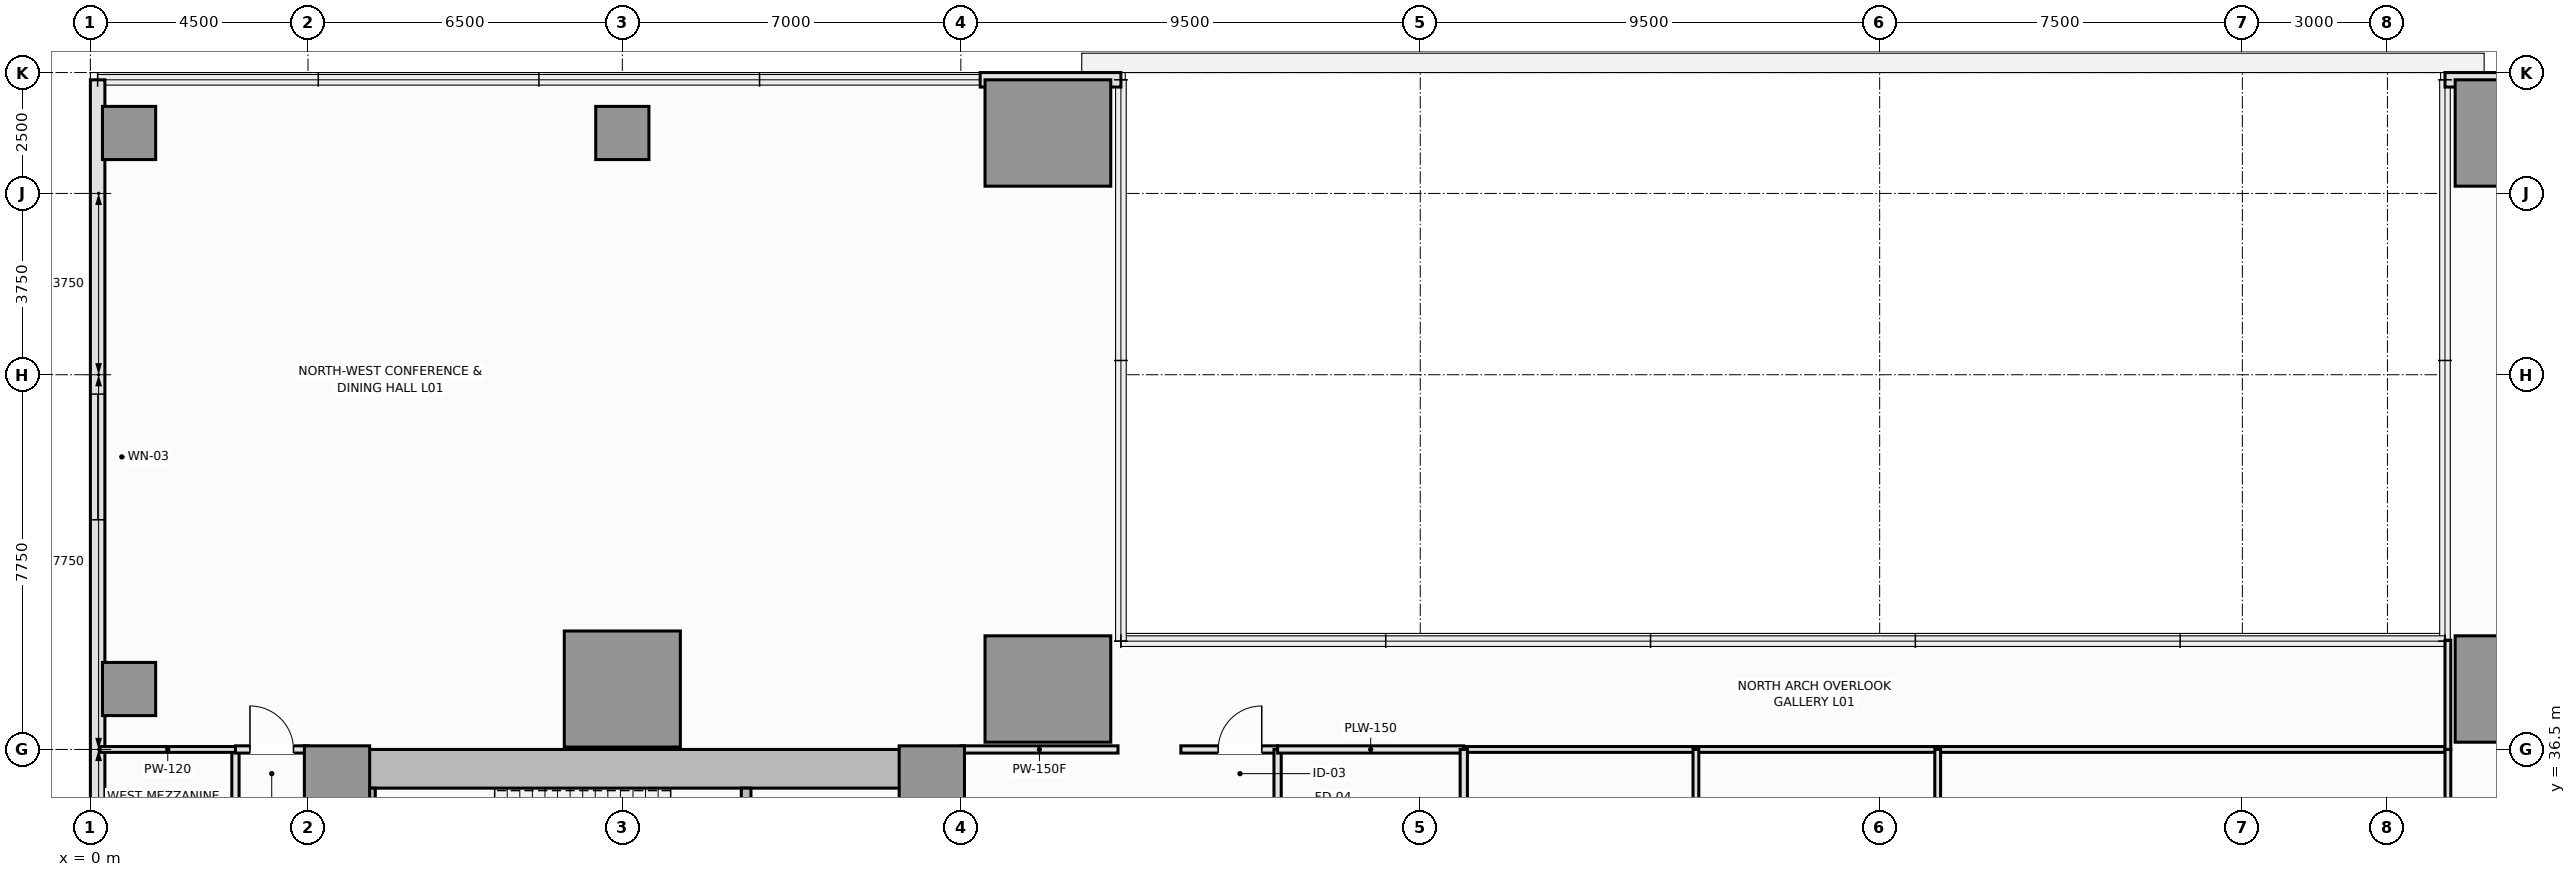
"""IFC4 building model, lengths in metres.
Left out: names, types, materials, properties, quantities, classifications, styles, units other than length and angle.
Written with IfcOpenShell. Run it as: python <this file> out.ifc"""

import sys

from ifc_helpers import new_model, si_unit, direction, frame, frame_2d, origin, origin_2d, place, context, subcontext, project, spatial, rectangle, extrude, element, fill, save


model = new_model("IFC4")
c1 = context("Model", 3, precision=1e-05, world=origin(), true_north=direction((0.0, 1.0)))
c2 = subcontext(c1, "Body", "Model", "MODEL_VIEW")
j1 = project(units=[si_unit("LENGTHUNIT", "METRE"), si_unit("PLANEANGLEUNIT", "RADIAN")], contexts=[c1])
p1 = place(None, origin())
s1 = spatial("IfcSite", under=j1, at=p1, CompositionType="ELEMENT")
p2 = place(p1, origin())
s2 = spatial("IfcBuilding", under=s1, at=p2, CompositionType="ELEMENT")
p3 = place(p2, frame((0.0, 0.0, 6.0)))
s3 = spatial("IfcBuildingStorey", under=s2, at=p3, CompositionType="ELEMENT", Elevation=6.0)
p4 = place(p3, frame((4.5, 36.1, 0.0), z_axis=(0.0, 0.0, 1.0), x_axis=(1.0, 0.0, 0.0)))
e1 = element("IfcWall", 1, at=p4, inside=s3, PredefinedType="SHEAR", context=c2, shape_type="SweptSolid", body=[
    extrude(rectangle(XDim=13.5, YDim=0.8, at=frame_2d((6.75, 0.0))), origin(), (0.0, 0.0, 1.0), 4.8),
])
p5 = place(p3, frame((4.9, 14.8, 0.0), z_axis=(0.0, 0.0, 1.0), x_axis=(0.0, 1.0, 0.0)))
e2 = element("IfcWall", 2, at=p5, inside=s3, PredefinedType="SHEAR", context=c2, shape_type="SweptSolid", body=[
    extrude(rectangle(XDim=20.9, YDim=0.8, at=frame_2d((10.45, 0.0))), origin(), (0.0, 0.0, 1.0), 4.8),
])
p6 = place(p3, frame((17.6, 27.05, 0.0), z_axis=(0.0, 0.0, 1.0), x_axis=(0.0, 1.0, 0.0)))
e3 = element("IfcWall", 3, at=p6, inside=s3, PredefinedType="SHEAR", context=c2, shape_type="SweptSolid", body=[
    extrude(rectangle(XDim=8.65, YDim=0.8, at=frame_2d((4.325, 0.0))), origin(), (0.0, 0.0, 1.0), 4.8),
])
p7 = place(p6, frame((3.45, 0.0, 0.0)))
e4 = element("IfcOpeningElement", 4, at=p7, cuts=e3, PredefinedType="OPENING", context=c2, shape_type="SweptSolid", body=[
    extrude(rectangle(XDim=1.1, YDim=2.15, at=frame_2d((0.55, 1.075))), frame((0.0, 0.41, 0.0), z_axis=(0.0, -1.0, 0.0), x_axis=(1.0, 0.0, 0.0)), (0.0, 0.0, 1.0), 0.82),
])
for number, where, z_axis, x_axis in (
    (5, (5.1, 35.9, 0.0), (0.0, 0.0, 1.0), (1.0, 0.0, 0.0)),
    (6, (17.4, 35.9, 0.0), (0.0, 0.0, 1.0), (1.0, 0.0, 0.0)),
):
    element("IfcColumn", number, at=place(p3, frame(where, z_axis=z_axis, x_axis=x_axis)), inside=s3, PredefinedType="PILASTER", context=c2, shape_type="SweptSolid", body=[
        extrude(rectangle(XDim=1.35, YDim=1.35, at=origin_2d()), origin(), (0.0, 0.0, 1.0), 4.8),
    ])
p8 = place(p3, frame((11.0, 37.75, 0.0), z_axis=(0.0, 0.0, 1.0), x_axis=(1.0, 0.0, 0.0)))
e7 = element("IfcColumn", 7, at=p8, inside=s3, PredefinedType="COLUMN", context=c2, shape_type="SweptSolid", body=[
    extrude(rectangle(XDim=2.4, YDim=2.4, at=origin_2d()), origin(), (0.0, 0.0, 1.0), 4.8),
])
for number, where, z_axis, x_axis in (
    (8, (19.8, 37.75, 0.0), (0.0, 0.0, 1.0), (1.0, 0.0, 0.0)),
    (9, (50.2, 37.75, 0.0), (0.0, 0.0, 1.0), (1.0, 0.0, 0.0)),
    (10, (19.8, 49.25, 0.0), (0.0, 0.0, 1.0), (1.0, 0.0, 0.0)),
    (11, (50.2, 49.25, 0.0), (0.0, 0.0, 1.0), (1.0, 0.0, 0.0)),
):
    element("IfcColumn", number, at=place(p3, frame(where, z_axis=z_axis, x_axis=x_axis)), inside=s3, PredefinedType="COLUMN", context=c2, shape_type="SweptSolid", body=[
        extrude(rectangle(XDim=2.6, YDim=2.2, at=origin_2d()), origin(), (0.0, 0.0, 1.0), 4.8),
    ])
for number, where, z_axis, x_axis in (
    (12, (0.8, 37.75, 0.0), (0.0, 0.0, 1.0), (1.0, 0.0, 0.0)),
    (13, (0.8, 49.25, 0.0), (0.0, 0.0, 1.0), (1.0, 0.0, 0.0)),
    (14, (11.0, 49.25, 0.0), (0.0, 0.0, 1.0), (1.0, 0.0, 0.0)),
):
    element("IfcColumn", number, at=place(p3, frame(where, z_axis=z_axis, x_axis=x_axis)), inside=s3, PredefinedType="COLUMN", context=c2, shape_type="SweptSolid", body=[
        extrude(rectangle(XDim=1.1, YDim=1.1, at=origin_2d()), origin(), (0.0, 0.0, 1.0), 4.8),
    ])
p9 = place(p3, frame((0.15, 50.35, 0.0), z_axis=(0.0, 0.0, 1.0), x_axis=(0.0, -1.0, 0.0)))
e15 = element("IfcWall", 15, at=p9, inside=s3, PredefinedType="SOLIDWALL", context=c2, shape_type="SweptSolid", body=[
    extrude(rectangle(XDim=50.2, YDim=0.3, at=frame_2d((25.1, 0.0))), origin(), (0.0, 0.0, 1.0), 4.6),
])
p10 = place(p9, frame((6.5, 0.0, 0.9)))
e16 = element("IfcOpeningElement", 16, at=p10, cuts=e15, PredefinedType="OPENING", context=c2, shape_type="SweptSolid", body=[
    extrude(rectangle(XDim=2.6, YDim=2.2, at=frame_2d((1.3, 1.1))), frame((0.0, 0.16, 0.0), z_axis=(0.0, -1.0, 0.0), x_axis=(1.0, 0.0, 0.0)), (0.0, 0.0, 1.0), 0.32),
])
p11 = place(p9, frame((42.0, 0.0, 0.9)))
e17 = element("IfcOpeningElement", 17, at=p11, cuts=e15, PredefinedType="OPENING", context=c2, shape_type="SweptSolid", body=[
    extrude(rectangle(XDim=2.6, YDim=2.2, at=frame_2d((1.3, 1.1))), frame((0.0, 0.16, 0.0), z_axis=(0.0, -1.0, 0.0), x_axis=(1.0, 0.0, 0.0)), (0.0, 0.0, 1.0), 0.32),
])
for number, where, z_axis, x_axis in (
    (18, (51.6, 50.35, 0.0), (0.0, 0.0, 1.0), (-1.0, 0.0, 0.0)),
    (19, (21.31, 50.35, 0.0), (0.0, 0.0, 1.0), (-1.0, 0.0, 0.0)),
):
    element("IfcWall", number, at=place(p3, frame(where, z_axis=z_axis, x_axis=x_axis)), inside=s3, PredefinedType="SOLIDWALL", context=c2, shape_type="SweptSolid", body=[
        extrude(rectangle(XDim=2.91, YDim=0.3, at=frame_2d((1.455, 0.0))), origin(), (0.0, 0.0, 1.0), 4.6),
    ])
p12 = place(p3, frame((5.79, 32.65, 0.0), z_axis=(0.0, 0.0, 1.0), x_axis=(0.0, 1.0, 0.0)))
e20 = element("IfcWall", 20, at=p12, inside=s3, PredefinedType="SOLIDWALL", context=c2, shape_type="SweptSolid", body=[
    extrude(rectangle(XDim=3.05, YDim=0.2, at=frame_2d((1.525, 0.0))), origin(), (0.0, 0.0, 1.0), 4.8),
])
p13 = place(p3, frame((13.56, 32.65, 0.0), z_axis=(0.0, 0.0, 1.0), x_axis=(0.0, 1.0, 0.0)))
e21 = element("IfcWall", 21, at=p13, inside=s3, PredefinedType="SOLIDWALL", context=c2, shape_type="SweptSolid", body=[
    extrude(rectangle(XDim=3.05, YDim=0.2, at=frame_2d((1.525, 0.0))), origin(), (0.0, 0.0, 1.0), 4.8),
])
p14 = place(p13, frame((0.95, 0.0, 0.0)))
e22 = element("IfcOpeningElement", 22, at=p14, cuts=e21, PredefinedType="OPENING", context=c2, shape_type="SweptSolid", body=[
    extrude(rectangle(XDim=1.15, YDim=2.15, at=frame_2d((0.575, 1.075))), frame((0.0, 0.11, 0.0), z_axis=(0.0, -1.0, 0.0), x_axis=(1.0, 0.0, 0.0)), (0.0, 0.0, 1.0), 0.22),
])
p15 = place(p3, frame((18.0, 36.5, 0.0), z_axis=(0.0, 0.0, 1.0), x_axis=(1.0, 0.0, 0.0)))
e23 = element("IfcWall", 23, at=p15, inside=s3, PredefinedType="PARTITIONING", context=c2, shape_type="SweptSolid", body=[
    extrude(rectangle(XDim=3.25, YDim=0.15, at=frame_2d((1.625, 0.0))), origin(), (0.0, 0.0, 1.0), 4.6),
])
p16 = place(p3, frame((22.55, 36.5, 0.0), z_axis=(0.0, 0.0, 1.0), x_axis=(1.0, 0.0, 0.0)))
e24 = element("IfcWall", 24, at=p16, inside=s3, PredefinedType="PARTITIONING", context=c2, shape_type="SweptSolid", body=[
    extrude(rectangle(XDim=2.0, YDim=0.15, at=frame_2d((1.0, 0.0))), origin(), (0.0, 0.0, 1.0), 4.6),
])
p17 = place(p16, frame((0.772, 0.0, 0.0)))
e25 = element("IfcOpeningElement", 25, at=p17, cuts=e24, PredefinedType="OPENING", context=c2, shape_type="SweptSolid", body=[
    extrude(rectangle(XDim=0.9, YDim=2.1, at=frame_2d((0.45, 1.05))), frame((0.0, 0.085, 0.0), z_axis=(0.0, -1.0, 0.0), x_axis=(1.0, 0.0, 0.0)), (0.0, 0.0, 1.0), 0.17),
])
p18 = place(p3, frame((24.55, 33.4, 0.0), z_axis=(0.0, 0.0, 1.0), x_axis=(0.0, 1.0, 0.0)))
e26 = element("IfcWall", 26, at=p18, inside=s3, PredefinedType="PLUMBINGWALL", context=c2, shape_type="SweptSolid", body=[
    extrude(rectangle(XDim=3.1, YDim=0.15, at=frame_2d((1.55, 0.0))), origin(), (0.0, 0.0, 1.0), 4.6),
])
p19 = place(p18, frame((1.1, 0.0, 0.0)))
e27 = element("IfcOpeningElement", 27, at=p19, cuts=e26, PredefinedType="OPENING", context=c2, shape_type="SweptSolid", body=[
    extrude(rectangle(XDim=0.9, YDim=2.1, at=frame_2d((0.45, 1.05))), frame((0.0, 0.085, 0.0), z_axis=(0.0, -1.0, 0.0), x_axis=(1.0, 0.0, 0.0)), (0.0, 0.0, 1.0), 0.17),
])
p20 = place(p3, frame((3.0, 25.25, 0.0), z_axis=(0.0, 0.0, 1.0), x_axis=(0.0, 1.0, 0.0)))
e28 = element("IfcWall", 28, at=p20, inside=s3, PredefinedType="PARTITIONING", context=c2, shape_type="SweptSolid", body=[
    extrude(rectangle(XDim=11.25, YDim=0.15, at=frame_2d((5.625, 0.0))), origin(), (0.0, 0.0, 1.0), 4.6),
])
p21 = place(p20, frame((5.125, 0.0, 0.0)))
e29 = element("IfcOpeningElement", 29, at=p21, cuts=e28, PredefinedType="OPENING", context=c2, shape_type="SweptSolid", body=[
    extrude(rectangle(XDim=1.0, YDim=2.15, at=frame_2d((0.5, 1.075))), frame((0.0, 0.085, 0.0), z_axis=(0.0, -1.0, 0.0), x_axis=(1.0, 0.0, 0.0)), (0.0, 0.0, 1.0), 0.17),
])
p22 = place(p3, frame((3.0, 36.5, 0.0), z_axis=(0.0, 0.0, 1.0), x_axis=(1.0, 0.0, 0.0)))
e30 = element("IfcWall", 30, at=p22, inside=s3, PredefinedType="PARTITIONING", context=c2, shape_type="SweptSolid", body=[
    extrude(rectangle(XDim=1.5, YDim=0.15, at=frame_2d((0.75, 0.0))), origin(), (0.0, 0.0, 1.0), 4.6),
])
p23 = place(p22, frame((0.3, 0.0, 0.0)))
e31 = element("IfcOpeningElement", 31, at=p23, cuts=e30, PredefinedType="OPENING", context=c2, shape_type="SweptSolid", body=[
    extrude(rectangle(XDim=0.9, YDim=2.1, at=frame_2d((0.45, 1.05))), frame((0.0, 0.085, 0.0), z_axis=(0.0, -1.0, 0.0), x_axis=(1.0, 0.0, 0.0)), (0.0, 0.0, 1.0), 0.17),
])
p24 = place(p3, frame((0.2, 36.5, 0.0), z_axis=(0.0, 0.0, 1.0), x_axis=(1.0, 0.0, 0.0)))
e32 = element("IfcWall", 32, at=p24, inside=s3, PredefinedType="PARTITIONING", context=c2, shape_type="SweptSolid", body=[
    extrude(rectangle(XDim=2.8, YDim=0.12, at=frame_2d((1.4, 0.0))), origin(), (0.0, 0.0, 1.0), 4.6),
])
p25 = place(p3, frame((24.55, 36.5, 0.0), z_axis=(0.0, 0.0, 1.0), x_axis=(1.0, 0.0, 0.0)))
e33 = element("IfcWall", 33, at=p25, inside=s3, PredefinedType="PLUMBINGWALL", context=c2, shape_type="SweptSolid", body=[
    extrude(rectangle(XDim=3.85, YDim=0.15, at=frame_2d((1.925, 0.0))), origin(), (0.0, 0.0, 1.0), 4.6),
])
p26 = place(p3, frame((28.4, 36.5, 0.0), z_axis=(0.0, 0.0, 1.0), x_axis=(1.0, 0.0, 0.0)))
e34 = element("IfcWall", 34, at=p26, inside=s3, PredefinedType="PARTITIONING", context=c2, shape_type="SweptSolid", body=[
    extrude(rectangle(XDim=4.8, YDim=0.12, at=frame_2d((2.4, 0.0))), origin(), (0.0, 0.0, 1.0), 4.6),
])
p27 = place(p3, frame((33.2, 36.5, 0.0), z_axis=(0.0, 0.0, 1.0), x_axis=(1.0, 0.0, 0.0)))
e35 = element("IfcWall", 35, at=p27, inside=s3, PredefinedType="PARTITIONING", context=c2, shape_type="SweptSolid", body=[
    extrude(rectangle(XDim=5.0, YDim=0.12, at=frame_2d((2.5, 0.0))), origin(), (0.0, 0.0, 1.0), 4.6),
])
p28 = place(p3, frame((38.2, 36.5, 0.0), z_axis=(0.0, 0.0, 1.0), x_axis=(1.0, 0.0, 0.0)))
e36 = element("IfcWall", 36, at=p28, inside=s3, PredefinedType="PARTITIONING", context=c2, shape_type="SweptSolid", body=[
    extrude(rectangle(XDim=10.55, YDim=0.12, at=frame_2d((5.275, 0.0))), origin(), (0.0, 0.0, 1.0), 4.6),
])
p29 = place(p3, frame((48.75, 36.5, 0.0), z_axis=(0.0, 0.0, 1.0), x_axis=(0.0, 1.0, 0.0)))
e37 = element("IfcWall", 37, at=p29, inside=s3, PredefinedType="PARTITIONING", context=c2, shape_type="SweptSolid", body=[
    extrude(rectangle(XDim=2.26, YDim=0.12, at=frame_2d((1.13, 0.0))), origin(), (0.0, 0.0, 1.0), 4.6),
])
p30 = place(p3, frame((28.4, 33.4, 0.0), z_axis=(0.0, 0.0, 1.0), x_axis=(0.0, 1.0, 0.0)))
e38 = element("IfcWall", 38, at=p30, inside=s3, PredefinedType="PLUMBINGWALL", context=c2, shape_type="SweptSolid", body=[
    extrude(rectangle(XDim=3.1, YDim=0.15, at=frame_2d((1.55, 0.0))), origin(), (0.0, 0.0, 1.0), 4.6),
])
p31 = place(p3, frame((33.2, 21.7, 0.0), z_axis=(0.0, 0.0, 1.0), x_axis=(0.0, 1.0, 0.0)))
e39 = element("IfcWall", 39, at=p31, inside=s3, PredefinedType="PARTITIONING", context=c2, shape_type="SweptSolid", body=[
    extrude(rectangle(XDim=14.8, YDim=0.12, at=frame_2d((7.4, 0.0))), origin(), (0.0, 0.0, 1.0), 4.6),
])
p32 = place(p3, frame((38.2, 21.7, 0.0), z_axis=(0.0, 0.0, 1.0), x_axis=(0.0, 1.0, 0.0)))
e40 = element("IfcWall", 40, at=p32, inside=s3, PredefinedType="PARTITIONING", context=c2, shape_type="SweptSolid", body=[
    extrude(rectangle(XDim=14.8, YDim=0.12, at=frame_2d((7.4, 0.0))), origin(), (0.0, 0.0, 1.0), 4.0),
])
p33 = place(p3, frame((48.75, 21.7, 0.0), z_axis=(0.0, 0.0, 1.0), x_axis=(0.0, 1.0, 0.0)))
e41 = element("IfcWall", 41, at=p33, inside=s3, PredefinedType="PARTITIONING", context=c2, shape_type="SweptSolid", body=[
    extrude(rectangle(XDim=14.8, YDim=0.12, at=frame_2d((7.4, 0.0))), origin(), (0.0, 0.0, 1.0), 4.6),
])
p34 = place(p10, origin())
e42 = element("IfcWindow", 42, at=p34, inside=s3, PartitioningType="SINGLE_PANEL", PredefinedType="WINDOW", context=c2, shape_type="SweptSolid", body=[
    extrude(rectangle(XDim=2.6, YDim=2.2, at=frame_2d((1.3, 1.1))), frame((0.0, 0.03, 0.0), z_axis=(0.0, -1.0, 0.0), x_axis=(1.0, 0.0, 0.0)), (0.0, 0.0, 1.0), 0.06),
])
fill(e16, e42)
p35 = place(p17, origin())
e43 = element("IfcDoor", 43, at=p35, inside=s3, OperationType="SINGLE_SWING_RIGHT", PredefinedType="DOOR", context=c2, shape_type="SweptSolid", body=[
    extrude(rectangle(XDim=0.9, YDim=2.1, at=frame_2d((0.45, 1.05))), frame((0.0, 0.025, 0.0), z_axis=(0.0, -1.0, 0.0), x_axis=(1.0, 0.0, 0.0)), (0.0, 0.0, 1.0), 0.05),
])
fill(e25, e43)
p36 = place(p23, origin())
e44 = element("IfcDoor", 44, at=p36, inside=s3, OperationType="SINGLE_SWING_LEFT", PredefinedType="DOOR", context=c2, shape_type="SweptSolid", body=[
    extrude(rectangle(XDim=0.9, YDim=2.1, at=frame_2d((0.45, 1.05))), frame((0.0, 0.025, 0.0), z_axis=(0.0, -1.0, 0.0), x_axis=(1.0, 0.0, 0.0)), (0.0, 0.0, 1.0), 0.05),
])
fill(e31, e44)
save(model, sys.argv[1])
